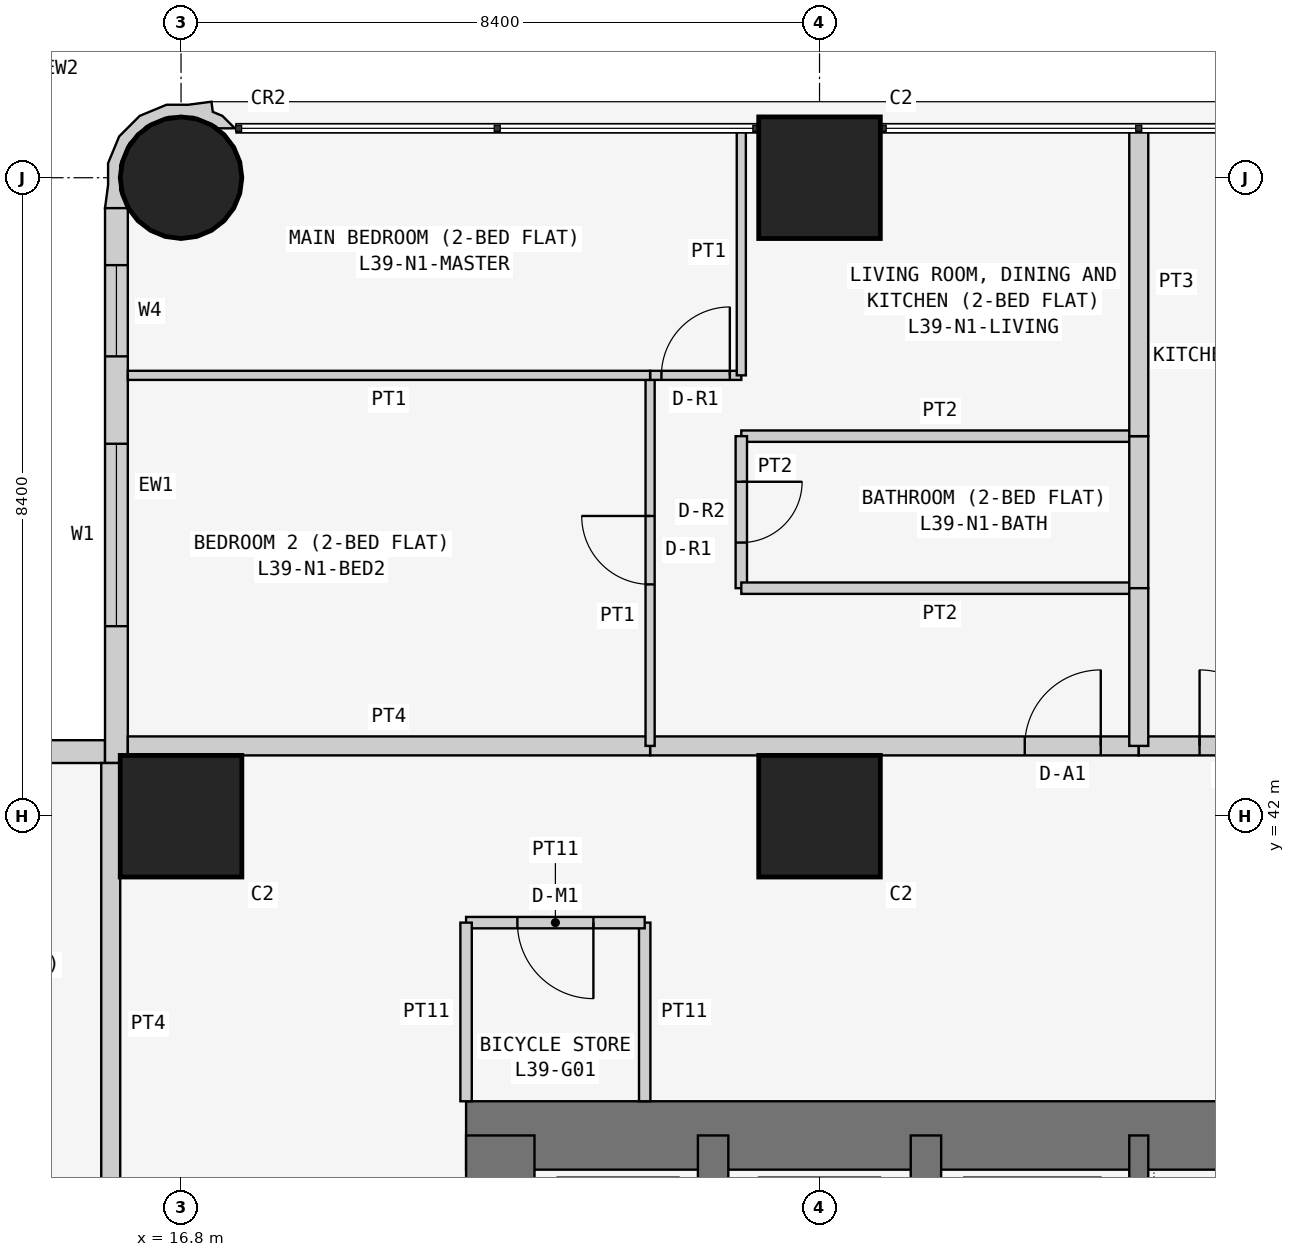
"""IFC4 building model, lengths in metres.
Left out: names, types, materials, properties, quantities, classifications, styles, units other than length and angle.
Written with IfcOpenShell. Run it as: python <this file> out.ifc"""

import sys

from ifc_helpers import new_model, si_unit, direction, frame, frame_2d, origin, origin_2d, place, context, subcontext, project, spatial, polyline, rectangle, circle, outline, extrude, element, fill, save


model = new_model("IFC4")
c1 = context("Model", 3, precision=1e-05, world=origin(), true_north=direction((0.0, 1.0)))
c2 = subcontext(c1, "Body", "Model", "MODEL_VIEW")
j1 = project(units=[si_unit("LENGTHUNIT", "METRE"), si_unit("PLANEANGLEUNIT", "RADIAN")], contexts=[c1])
p1 = place(None, origin())
s1 = spatial("IfcSite", under=j1, at=p1, CompositionType="ELEMENT")
p2 = place(p1, origin())
s2 = spatial("IfcBuilding", under=s1, at=p2, CompositionType="ELEMENT")
p3 = place(p2, frame((0.0, 0.0, 152.1)))
s3 = spatial("IfcBuildingStorey", under=s2, at=p3, CompositionType="ELEMENT", Elevation=152.1)
p4 = place(p3, frame((16.8, 42.0, 0.0), z_axis=(0.0, 0.0, 1.0), x_axis=(1.0, 0.0, 0.0)))
e1 = element("IfcColumn", 1, at=p4, inside=s3, PredefinedType="COLUMN", context=c2, shape_type="SweptSolid", body=[
    extrude(rectangle(XDim=1.6, YDim=1.6, at=origin_2d()), origin(), (0.0, 0.0, 1.0), 3.6),
])
p5 = place(p3, frame((16.8, 50.4, 0.0), z_axis=(0.0, 0.0, 1.0), x_axis=(1.0, 0.0, 0.0)))
e2 = element("IfcColumn", 2, at=p5, inside=s3, PredefinedType="COLUMN", context=c2, shape_type="SweptSolid", body=[
    extrude(circle(Radius=0.8, at=origin_2d()), origin(), (0.0, 0.0, 1.0), 3.6),
])
for number, where, z_axis, x_axis in (
    (3, (25.2, 42.0, 0.0), (0.0, 0.0, 1.0), (1.0, 0.0, 0.0)),
    (4, (25.2, 50.4, 0.0), (0.0, 0.0, 1.0), (1.0, 0.0, 0.0)),
):
    element("IfcColumn", number, at=place(p3, frame(where, z_axis=z_axis, x_axis=x_axis)), inside=s3, PredefinedType="COLUMN", context=c2, shape_type="SweptSolid", body=[
        extrude(rectangle(XDim=1.6, YDim=1.6, at=origin_2d()), origin(), (0.0, 0.0, 1.0), 3.6),
    ])
p6 = place(p3, frame((37.8, 37.8, 0.0), z_axis=(0.0, 0.0, 1.0), x_axis=(-1.0, 0.0, 0.0)))
e5 = element("IfcWall", 5, at=p6, inside=s3, PredefinedType="SHEAR", context=c2, shape_type="SweptSolid", body=[
    extrude(rectangle(XDim=17.25, YDim=0.9, at=frame_2d((8.625, 0.0))), origin(), (0.0, 0.0, 1.0), 3.6),
])
p7 = place(p3, frame((21.0, 37.8, 0.0), z_axis=(0.0, 0.0, 1.0), x_axis=(0.0, -1.0, 0.0)))
e6 = element("IfcWall", 6, at=p7, inside=s3, PredefinedType="SHEAR", context=c2, shape_type="SweptSolid", body=[
    extrude(rectangle(XDim=17.25, YDim=0.9, at=frame_2d((8.625, 0.0))), origin(), (0.0, 0.0, 1.0), 3.6),
])
p8 = place(p7, frame((5.4, 0.0, 0.0)))
e7 = element("IfcOpeningElement", 7, at=p8, cuts=e6, PredefinedType="OPENING", context=c2, shape_type="SweptSolid", body=[
    extrude(rectangle(XDim=1.2, YDim=2.1, at=frame_2d((0.6, 1.05))), frame((0.0, 0.46, 0.0), z_axis=(0.0, -1.0, 0.0), x_axis=(1.0, 0.0, 0.0)), (0.0, 0.0, 1.0), 0.92),
])
p9 = place(p3, frame((26.6, 21.0, 0.0), z_axis=(0.0, 0.0, 1.0), x_axis=(0.0, 1.0, 0.0)))
e8 = element("IfcWall", 8, at=p9, inside=s3, PredefinedType="SHEAR", context=c2, shape_type="SweptSolid", body=[
    extrude(rectangle(XDim=16.8, YDim=0.4, at=frame_2d((8.4, 0.0))), origin(), (0.0, 0.0, 1.0), 3.6),
])
p10 = place(p9, frame((10.4, 0.0, 0.0)))
e9 = element("IfcOpeningElement", 9, at=p10, cuts=e8, PredefinedType="OPENING", context=c2, shape_type="SweptSolid", body=[
    extrude(rectangle(XDim=1.2, YDim=2.1, at=frame_2d((0.6, 1.05))), frame((0.0, 0.21, 0.0), z_axis=(0.0, -1.0, 0.0), x_axis=(1.0, 0.0, 0.0)), (0.0, 0.0, 1.0), 0.42),
])
p11 = place(p3, frame((23.8, 34.6, 0.0), z_axis=(0.0, 0.0, 1.0), x_axis=(0.0, 1.0, 0.0)))
e10 = element("IfcWall", 10, at=p11, inside=s3, PredefinedType="SHEAR", context=c2, shape_type="SweptSolid", body=[
    extrude(rectangle(XDim=3.2, YDim=0.4, at=frame_2d((1.6, 0.0))), origin(), (0.0, 0.0, 1.0), 3.6),
])
p12 = place(p3, frame((29.4, 34.6, 0.0), z_axis=(0.0, 0.0, 1.0), x_axis=(0.0, 1.0, 0.0)))
e11 = element("IfcWall", 11, at=p12, inside=s3, PredefinedType="SHEAR", context=c2, shape_type="SweptSolid", body=[
    extrude(rectangle(XDim=3.2, YDim=0.25, at=frame_2d((1.6, 0.0))), origin(), (0.0, 0.0, 1.0), 3.6),
])
p13 = place(p3, frame((15.8, 42.85, 0.0), z_axis=(0.0, 0.0, 1.0), x_axis=(-1.0, 0.0, 0.0)))
e12 = element("IfcWall", 12, at=p13, inside=s3, PredefinedType="SOLIDWALL", context=c2, shape_type="SweptSolid", body=[
    extrude(rectangle(XDim=15.4, YDim=0.3, at=frame_2d((7.7, 0.0))), origin(), (0.0, 0.0, 1.0), 3.45),
])
p14 = place(p13, frame((1.2, 0.0, 0.9)))
e13 = element("IfcOpeningElement", 13, at=p14, cuts=e12, PredefinedType="OPENING", context=c2, shape_type="SweptSolid", body=[
    extrude(rectangle(XDim=1.8, YDim=1.5, at=frame_2d((0.9, 0.75))), frame((0.0, 0.16, 0.0), z_axis=(0.0, -1.0, 0.0), x_axis=(1.0, 0.0, 0.0)), (0.0, 0.0, 1.0), 0.32),
])
p15 = place(p13, frame((4.95, 0.0, 1.5)))
e14 = element("IfcOpeningElement", 14, at=p15, cuts=e12, PredefinedType="OPENING", context=c2, shape_type="SweptSolid", body=[
    extrude(rectangle(XDim=0.9, YDim=0.7, at=frame_2d((0.45, 0.35))), frame((0.0, 0.16, 0.0), z_axis=(0.0, -1.0, 0.0), x_axis=(1.0, 0.0, 0.0)), (0.0, 0.0, 1.0), 0.32),
])
p16 = place(p13, frame((8.5, 0.0, 0.9)))
e15 = element("IfcOpeningElement", 15, at=p16, cuts=e12, PredefinedType="OPENING", context=c2, shape_type="SweptSolid", body=[
    extrude(rectangle(XDim=1.8, YDim=1.5, at=frame_2d((0.9, 0.75))), frame((0.0, 0.16, 0.0), z_axis=(0.0, -1.0, 0.0), x_axis=(1.0, 0.0, 0.0)), (0.0, 0.0, 1.0), 0.32),
])
p17 = place(p13, frame((12.5, 0.0, 0.0)))
e16 = element("IfcOpeningElement", 16, at=p17, cuts=e12, PredefinedType="OPENING", context=c2, shape_type="SweptSolid", body=[
    extrude(rectangle(XDim=0.9, YDim=2.4, at=frame_2d((0.45, 1.2))), frame((0.0, 0.16, 0.0), z_axis=(0.0, -1.0, 0.0), x_axis=(1.0, 0.0, 0.0)), (0.0, 0.0, 1.0), 0.32),
])
p18 = place(p13, frame((13.5, 0.0, 0.9)))
e17 = element("IfcOpeningElement", 17, at=p18, cuts=e12, PredefinedType="OPENING", context=c2, shape_type="SweptSolid", body=[
    extrude(rectangle(XDim=1.2, YDim=1.5, at=frame_2d((0.6, 0.75))), frame((0.0, 0.16, 0.0), z_axis=(0.0, -1.0, 0.0), x_axis=(1.0, 0.0, 0.0)), (0.0, 0.0, 1.0), 0.32),
])
p19 = place(p3, frame((15.95, 50.0, 0.0), z_axis=(0.0, 0.0, 1.0), x_axis=(0.0, -1.0, 0.0)))
e18 = element("IfcWall", 18, at=p19, inside=s3, PredefinedType="SOLIDWALL", context=c2, shape_type="SweptSolid", body=[
    extrude(rectangle(XDim=7.3, YDim=0.3, at=frame_2d((3.65, 0.0))), origin(), (0.0, 0.0, 1.0), 3.45),
])
p20 = place(p19, frame((3.1, 0.0, 0.9)))
e19 = element("IfcOpeningElement", 19, at=p20, cuts=e18, PredefinedType="OPENING", context=c2, shape_type="SweptSolid", body=[
    extrude(rectangle(XDim=2.4, YDim=1.5, at=frame_2d((1.2, 0.75))), frame((0.0, 0.16, 0.0), z_axis=(0.0, -1.0, 0.0), x_axis=(1.0, 0.0, 0.0)), (0.0, 0.0, 1.0), 0.32),
])
p21 = place(p19, frame((0.75, 0.0, 0.9)))
e20 = element("IfcOpeningElement", 20, at=p21, cuts=e18, PredefinedType="OPENING", context=c2, shape_type="SweptSolid", body=[
    extrude(rectangle(XDim=1.2, YDim=1.5, at=frame_2d((0.6, 0.75))), frame((0.0, 0.16, 0.0), z_axis=(0.0, -1.0, 0.0), x_axis=(1.0, 0.0, 0.0)), (0.0, 0.0, 1.0), 0.32),
])
p22 = place(p3, frame((17.448, 50.995, 0.0), z_axis=(0.0, 0.0, 1.0), x_axis=(-0.343276641956, 0.93923434088, 0.0)))
e21 = element("IfcWall", 21, at=p22, inside=s3, PredefinedType="SOLIDWALL", context=c2, shape_type="SweptSolid", body=[
    extrude(outline(polyline([(0.241, 0.023), (0.333, 0.124), (0.465, 0.094), (0.532, 0.393), (0.631, 0.663), (0.614, 1.045), (0.454, 1.391), (0.172, 1.649), (-0.098, 1.748), (-0.369, 1.89), (-0.509, 1.621), (-0.491, 1.615), (-0.479, 1.609), (-0.211, 1.62), (0.088, 1.511), (0.323, 1.295), (0.457, 1.006), (0.47, 0.688), (0.361, 0.389), (0.145, 0.154), (0.108, 0.137), (0.031, -0.075), (0.241, 0.023)])), origin(), (0.0, 0.0, 1.0), 3.45),
])
p23 = place(p3, frame((22.9, 38.25, 0.0), z_axis=(0.0, 0.0, 1.0), x_axis=(0.0, 1.0, 0.0)))
e22 = element("IfcWall", 22, at=p23, inside=s3, PredefinedType="PARTITIONING", context=c2, shape_type="SweptSolid", body=[
    extrude(rectangle(XDim=2.35, YDim=0.15, at=frame_2d((1.175, 0.0))), origin(), (0.0, 0.0, 1.0), 3.45),
])
p24 = place(p3, frame((22.9, 40.6, 0.0), z_axis=(0.0, 0.0, 1.0), x_axis=(-1.0, 0.0, 0.0)))
e23 = element("IfcWall", 23, at=p24, inside=s3, PredefinedType="PARTITIONING", context=c2, shape_type="SweptSolid", body=[
    extrude(rectangle(XDim=2.35, YDim=0.15, at=frame_2d((1.175, 0.0))), origin(), (0.0, 0.0, 1.0), 3.45),
])
p25 = place(p24, frame((0.675, 0.0, 0.0)))
e24 = element("IfcOpeningElement", 24, at=p25, cuts=e23, PredefinedType="OPENING", context=c2, shape_type="SweptSolid", body=[
    extrude(rectangle(XDim=1.0, YDim=2.1, at=frame_2d((0.5, 1.05))), frame((0.0, 0.085, 0.0), z_axis=(0.0, -1.0, 0.0), x_axis=(1.0, 0.0, 0.0)), (0.0, 0.0, 1.0), 0.17),
])
p26 = place(p3, frame((20.55, 40.6, 0.0), z_axis=(0.0, 0.0, 1.0), x_axis=(0.0, -1.0, 0.0)))
e25 = element("IfcWall", 25, at=p26, inside=s3, PredefinedType="PARTITIONING", context=c2, shape_type="SweptSolid", body=[
    extrude(rectangle(XDim=2.35, YDim=0.15, at=frame_2d((1.175, 0.0))), origin(), (0.0, 0.0, 1.0), 3.45),
])
p27 = place(p3, frame((22.971, 42.925, 0.0), z_axis=(0.0, 0.0, 1.0), x_axis=(1.0, 0.0, 0.0)))
e26 = element("IfcWall", 26, at=p27, inside=s3, PredefinedType="PARTITIONING", context=c2, shape_type="SweptSolid", body=[
    extrude(rectangle(XDim=6.429, YDim=0.25, at=frame_2d((3.214, 0.0))), origin(), (0.0, 0.0, 1.0), 3.45),
])
p28 = place(p27, frame((4.929, 0.0, 0.0)))
e27 = element("IfcOpeningElement", 27, at=p28, cuts=e26, PredefinedType="OPENING", context=c2, shape_type="SweptSolid", body=[
    extrude(rectangle(XDim=1.0, YDim=2.1, at=frame_2d((0.5, 1.05))), frame((0.0, 0.135, 0.0), z_axis=(0.0, -1.0, 0.0), x_axis=(1.0, 0.0, 0.0)), (0.0, 0.0, 1.0), 0.27),
])
p29 = place(p3, frame((16.1, 42.925, 0.0), z_axis=(0.0, 0.0, 1.0), x_axis=(1.0, 0.0, 0.0)))
e28 = element("IfcWall", 28, at=p29, inside=s3, PredefinedType="PARTITIONING", context=c2, shape_type="SweptSolid", body=[
    extrude(rectangle(XDim=6.871, YDim=0.25, at=frame_2d((3.436, 0.0))), origin(), (0.0, 0.0, 1.0), 3.45),
])
p30 = place(p3, frame((29.4, 42.925, 0.0), z_axis=(0.0, 0.0, 1.0), x_axis=(1.0, 0.0, 0.0)))
e29 = element("IfcWall", 29, at=p30, inside=s3, PredefinedType="PARTITIONING", context=c2, shape_type="SweptSolid", body=[
    extrude(rectangle(XDim=2.6, YDim=0.25, at=frame_2d((1.3, 0.0))), origin(), (0.0, 0.0, 1.0), 3.45),
])
p31 = place(p30, frame((0.8, 0.0, 0.0)))
e30 = element("IfcOpeningElement", 30, at=p31, cuts=e29, PredefinedType="OPENING", context=c2, shape_type="SweptSolid", body=[
    extrude(rectangle(XDim=1.0, YDim=2.1, at=frame_2d((0.5, 1.05))), frame((0.0, 0.135, 0.0), z_axis=(0.0, -1.0, 0.0), x_axis=(1.0, 0.0, 0.0)), (0.0, 0.0, 1.0), 0.27),
])
p32 = place(p3, frame((15.875, 35.829, 0.0), z_axis=(0.0, 0.0, 1.0), x_axis=(0.0, 1.0, 0.0)))
e31 = element("IfcWall", 31, at=p32, inside=s3, PredefinedType="PARTITIONING", context=c2, shape_type="SweptSolid", body=[
    extrude(rectangle(XDim=6.871, YDim=0.25, at=frame_2d((3.436, 0.0))), origin(), (0.0, 0.0, 1.0), 3.45),
])
p33 = place(p3, frame((29.4, 47.0, 0.0), z_axis=(0.0, 0.0, 1.0), x_axis=(-1.0, 0.0, 0.0)))
e32 = element("IfcWall", 32, at=p33, inside=s3, PredefinedType="PARTITIONING", context=c2, shape_type="SweptSolid", body=[
    extrude(rectangle(XDim=5.229, YDim=0.15, at=frame_2d((2.615, 0.0))), origin(), (0.0, 0.0, 1.0), 3.45),
])
p34 = place(p3, frame((24.171, 47.0, 0.0), z_axis=(0.0, 0.0, 1.0), x_axis=(0.0, -1.0, 0.0)))
e33 = element("IfcWall", 33, at=p34, inside=s3, PredefinedType="PARTITIONING", context=c2, shape_type="SweptSolid", body=[
    extrude(rectangle(XDim=2.0, YDim=0.15, at=frame_2d((1.0, 0.0))), origin(), (0.0, 0.0, 1.0), 3.45),
])
p35 = place(p34, frame((0.6, 0.0, 0.0)))
e34 = element("IfcOpeningElement", 34, at=p35, cuts=e33, PredefinedType="OPENING", context=c2, shape_type="SweptSolid", body=[
    extrude(rectangle(XDim=0.8, YDim=2.1, at=frame_2d((0.4, 1.05))), frame((0.0, 0.085, 0.0), z_axis=(0.0, -1.0, 0.0), x_axis=(1.0, 0.0, 0.0)), (0.0, 0.0, 1.0), 0.17),
])
p36 = place(p3, frame((24.171, 45.0, 0.0), z_axis=(0.0, 0.0, 1.0), x_axis=(1.0, 0.0, 0.0)))
e35 = element("IfcWall", 35, at=p36, inside=s3, PredefinedType="PARTITIONING", context=c2, shape_type="SweptSolid", body=[
    extrude(rectangle(XDim=5.229, YDim=0.15, at=frame_2d((2.615, 0.0))), origin(), (0.0, 0.0, 1.0), 3.45),
])
p37 = place(p3, frame((29.4, 45.0, 0.0), z_axis=(0.0, 0.0, 1.0), x_axis=(0.0, 1.0, 0.0)))
e36 = element("IfcWall", 36, at=p37, inside=s3, PredefinedType="PARTITIONING", context=c2, shape_type="SweptSolid", body=[
    extrude(rectangle(XDim=2.0, YDim=0.25, at=frame_2d((1.0, 0.0))), origin(), (0.0, 0.0, 1.0), 2.848),
])
p38 = place(p3, frame((22.971, 42.925, 0.0), z_axis=(0.0, 0.0, 1.0), x_axis=(0.0, 1.0, 0.0)))
e37 = element("IfcWall", 37, at=p38, inside=s3, PredefinedType="PARTITIONING", context=c2, shape_type="SweptSolid", body=[
    extrude(rectangle(XDim=4.875, YDim=0.12, at=frame_2d((2.438, 0.0))), origin(), (0.0, 0.0, 1.0), 3.45),
])
p39 = place(p38, frame((2.125, 0.0, 0.0)))
e38 = element("IfcOpeningElement", 38, at=p39, cuts=e37, PredefinedType="OPENING", context=c2, shape_type="SweptSolid", body=[
    extrude(rectangle(XDim=0.9, YDim=2.1, at=frame_2d((0.45, 1.05))), frame((0.0, 0.07, 0.0), z_axis=(0.0, -1.0, 0.0), x_axis=(1.0, 0.0, 0.0)), (0.0, 0.0, 1.0), 0.14),
])
p40 = place(p3, frame((22.971, 47.8, 0.0), z_axis=(0.0, 0.0, 1.0), x_axis=(1.0, 0.0, 0.0)))
e39 = element("IfcWall", 39, at=p40, inside=s3, PredefinedType="PARTITIONING", context=c2, shape_type="SweptSolid", body=[
    extrude(rectangle(XDim=1.2, YDim=0.12, at=frame_2d((0.6, 0.0))), origin(), (0.0, 0.0, 1.0), 3.45),
])
p41 = place(p40, frame((0.149, 0.0, 0.0)))
e40 = element("IfcOpeningElement", 40, at=p41, cuts=e39, PredefinedType="OPENING", context=c2, shape_type="SweptSolid", body=[
    extrude(rectangle(XDim=0.9, YDim=2.1, at=frame_2d((0.45, 1.05))), frame((0.0, 0.07, 0.0), z_axis=(0.0, -1.0, 0.0), x_axis=(1.0, 0.0, 0.0)), (0.0, 0.0, 1.0), 0.14),
])
p42 = place(p3, frame((24.171, 47.8, 0.0), z_axis=(0.0, 0.0, 1.0), x_axis=(0.0, 1.0, 0.0)))
e41 = element("IfcWall", 41, at=p42, inside=s3, PredefinedType="PARTITIONING", context=c2, shape_type="SweptSolid", body=[
    extrude(rectangle(XDim=3.25, YDim=0.12, at=frame_2d((1.625, 0.0))), origin(), (0.0, 0.0, 1.0), 3.45),
])
p43 = place(p3, frame((29.4, 45.0, 0.0), z_axis=(0.0, 0.0, 1.0), x_axis=(0.0, -1.0, 0.0)))
e42 = element("IfcWall", 42, at=p43, inside=s3, PredefinedType="PARTITIONING", context=c2, shape_type="SweptSolid", body=[
    extrude(rectangle(XDim=2.075, YDim=0.25, at=frame_2d((1.038, 0.0))), origin(), (0.0, 0.0, 1.0), 2.848),
])
p44 = place(p3, frame((29.4, 51.05, 0.0), z_axis=(0.0, 0.0, 1.0), x_axis=(0.0, -1.0, 0.0)))
e43 = element("IfcWall", 43, at=p44, inside=s3, PredefinedType="PARTITIONING", context=c2, shape_type="SweptSolid", body=[
    extrude(rectangle(XDim=4.05, YDim=0.25, at=frame_2d((2.025, 0.0))), origin(), (0.0, 0.0, 1.0), 2.848),
])
p45 = place(p3, frame((22.971, 47.8, 0.0), z_axis=(0.0, 0.0, 1.0), x_axis=(-1.0, 0.0, 0.0)))
e44 = element("IfcWall", 44, at=p45, inside=s3, PredefinedType="PARTITIONING", context=c2, shape_type="SweptSolid", body=[
    extrude(rectangle(XDim=6.871, YDim=0.12, at=frame_2d((3.436, 0.0))), origin(), (0.0, 0.0, 1.0), 3.45),
])
p46 = place(p20, origin())
e45 = element("IfcWindow", 45, at=p46, inside=s3, PartitioningType="SINGLE_PANEL", PredefinedType="WINDOW", context=c2, shape_type="SweptSolid", body=[
    extrude(rectangle(XDim=2.4, YDim=1.5, at=frame_2d((1.2, 0.75))), frame((0.0, 0.03, 0.0), z_axis=(0.0, -1.0, 0.0), x_axis=(1.0, 0.0, 0.0)), (0.0, 0.0, 1.0), 0.06),
])
fill(e19, e45)
p47 = place(p21, origin())
e46 = element("IfcWindow", 46, at=p47, inside=s3, PartitioningType="SINGLE_PANEL", PredefinedType="WINDOW", context=c2, shape_type="SweptSolid", body=[
    extrude(rectangle(XDim=1.2, YDim=1.5, at=frame_2d((0.6, 0.75))), frame((0.0, 0.03, 0.0), z_axis=(0.0, -1.0, 0.0), x_axis=(1.0, 0.0, 0.0)), (0.0, 0.0, 1.0), 0.06),
])
fill(e20, e46)
p48 = place(p25, origin())
e47 = element("IfcDoor", 47, at=p48, inside=s3, OperationType="SINGLE_SWING_LEFT", PredefinedType="DOOR", context=c2, shape_type="SweptSolid", body=[
    extrude(rectangle(XDim=1.0, YDim=2.1, at=frame_2d((0.5, 1.05))), frame((0.0, 0.025, 0.0), z_axis=(0.0, -1.0, 0.0), x_axis=(1.0, 0.0, 0.0)), (0.0, 0.0, 1.0), 0.05),
])
fill(e24, e47)
p49 = place(p28, origin())
e48 = element("IfcDoor", 48, at=p49, inside=s3, OperationType="SINGLE_SWING_RIGHT", PredefinedType="DOOR", context=c2, shape_type="SweptSolid", body=[
    extrude(rectangle(XDim=1.0, YDim=2.1, at=frame_2d((0.5, 1.05))), frame((0.0, 0.025, 0.0), z_axis=(0.0, -1.0, 0.0), x_axis=(1.0, 0.0, 0.0)), (0.0, 0.0, 1.0), 0.05),
])
fill(e27, e48)
p50 = place(p35, origin())
e49 = element("IfcDoor", 49, at=p50, inside=s3, OperationType="SINGLE_SWING_LEFT", PredefinedType="DOOR", context=c2, shape_type="SweptSolid", body=[
    extrude(rectangle(XDim=0.8, YDim=2.1, at=frame_2d((0.4, 1.05))), frame((0.0, 0.025, 0.0), z_axis=(0.0, -1.0, 0.0), x_axis=(1.0, 0.0, 0.0)), (0.0, 0.0, 1.0), 0.05),
])
fill(e34, e49)
p51 = place(p39, origin())
e50 = element("IfcDoor", 50, at=p51, inside=s3, OperationType="SINGLE_SWING_RIGHT", PredefinedType="DOOR", context=c2, shape_type="SweptSolid", body=[
    extrude(rectangle(XDim=0.9, YDim=2.1, at=frame_2d((0.45, 1.05))), frame((0.0, 0.025, 0.0), z_axis=(0.0, -1.0, 0.0), x_axis=(1.0, 0.0, 0.0)), (0.0, 0.0, 1.0), 0.05),
])
fill(e38, e50)
p52 = place(p41, origin())
e51 = element("IfcDoor", 51, at=p52, inside=s3, OperationType="SINGLE_SWING_RIGHT", PredefinedType="DOOR", context=c2, shape_type="SweptSolid", body=[
    extrude(rectangle(XDim=0.9, YDim=2.1, at=frame_2d((0.45, 1.05))), frame((0.0, 0.025, 0.0), z_axis=(0.0, -1.0, 0.0), x_axis=(1.0, 0.0, 0.0)), (0.0, 0.0, 1.0), 0.05),
])
fill(e40, e51)
p53 = place(p31, origin())
e52 = element("IfcDoor", 52, at=p53, inside=s3, OperationType="SINGLE_SWING_LEFT", PredefinedType="DOOR", context=c2, shape_type="SweptSolid", body=[
    extrude(rectangle(XDim=1.0, YDim=2.1, at=frame_2d((0.5, 1.05))), frame((0.0, 0.025, 0.0), z_axis=(0.0, -1.0, 0.0), x_axis=(1.0, 0.0, 0.0)), (0.0, 0.0, 1.0), 0.05),
])
fill(e30, e52)
save(model, sys.argv[1])
